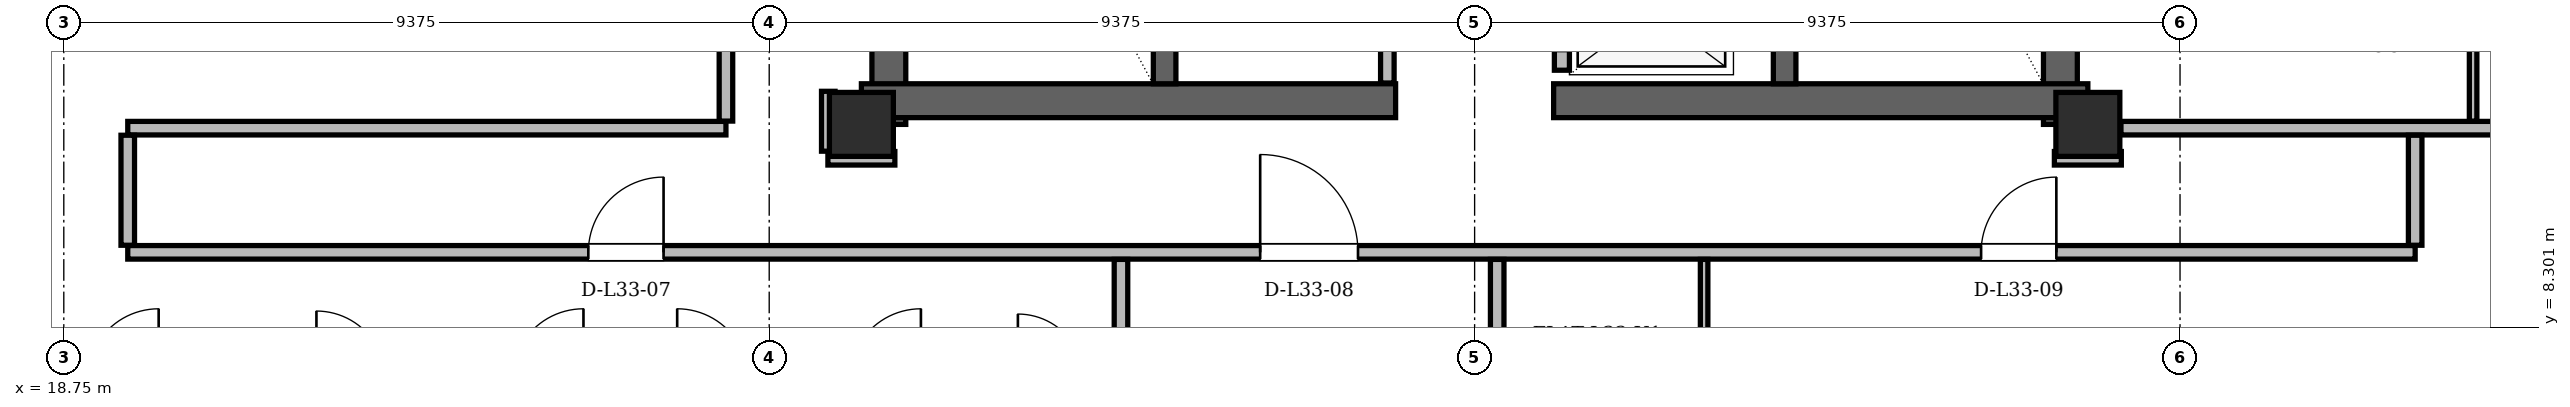
"""IFC4 building model, lengths in metres.
Left out: names, types, materials, properties, quantities, classifications, styles, units other than length and angle.
Written with IfcOpenShell. Run it as: python <this file> out.ifc"""

import sys

from ifc_helpers import new_model, si_unit, direction, frame, frame_2d, origin, origin_2d, place, context, subcontext, project, spatial, rectangle, hollow_rectangle, extrude, element, fill, save


model = new_model("IFC4")
c1 = context("Model", 3, precision=1e-05, world=origin(), true_north=direction((0.0, 1.0)))
c2 = subcontext(c1, "Body", "Model", "MODEL_VIEW")
j1 = project(units=[si_unit("LENGTHUNIT", "METRE"), si_unit("PLANEANGLEUNIT", "RADIAN")], contexts=[c1])
p1 = place(None, origin())
s1 = spatial("IfcSite", under=j1, at=p1, CompositionType="ELEMENT")
p2 = place(p1, origin())
s2 = spatial("IfcBuilding", under=s1, at=p2, CompositionType="ELEMENT")
p3 = place(p2, frame((0.0, 0.0, 126.6)))
s3 = spatial("IfcBuildingStorey", under=s2, at=p3, CompositionType="ELEMENT", Elevation=126.6)
for number, where, z_axis, x_axis in (
    (1, (29.35, 11.0, 0.0), (0.0, 0.0, 1.0), (1.0, 0.0, 0.0)),
    (2, (45.65, 11.0, 0.0), (0.0, 0.0, 1.0), (1.0, 0.0, 0.0)),
):
    element("IfcColumn", number, at=place(p3, frame(where, z_axis=z_axis, x_axis=x_axis)), inside=s3, PredefinedType="COLUMN", context=c2, shape_type="SweptSolid", body=[
        extrude(hollow_rectangle(XDim=0.85, YDim=0.85, WallThickness=0.07, at=origin_2d()), origin(), (0.0, 0.0, 1.0), 3.6),
    ])
for number, where, z_axis, x_axis in (
    (3, (29.715, 11.0, 0.0), (0.0, 0.0, 1.0), (0.0, 1.0, 0.0)),
    (4, (45.285, 11.0, 0.0), (0.0, 0.0, 1.0), (0.0, 1.0, 0.0)),
):
    element("IfcWall", number, at=place(p3, frame(where, z_axis=z_axis, x_axis=x_axis)), inside=s3, PredefinedType="SHEAR", context=c2, shape_type="SweptSolid", body=[
        extrude(rectangle(XDim=13.3, YDim=0.45, at=frame_2d((6.65, 0.0))), origin(), (0.0, 0.0, 1.0), 3.36),
    ])
for number, where, z_axis, x_axis in (
    (5, (29.35, 11.315, 0.0), (0.0, 0.0, 1.0), (1.0, 0.0, 0.0)),
    (6, (38.55, 11.315, 0.0), (0.0, 0.0, 1.0), (1.0, 0.0, 0.0)),
):
    element("IfcWall", number, at=place(p3, frame(where, z_axis=z_axis, x_axis=x_axis)), inside=s3, PredefinedType="SHEAR", context=c2, shape_type="SweptSolid", body=[
        extrude(rectangle(XDim=7.1, YDim=0.45, at=frame_2d((3.55, 0.0))), origin(), (0.0, 0.0, 1.0), 3.36),
    ])
for number, where, z_axis, x_axis in (
    (7, (33.38, 11.54, 0.0), (0.0, 0.0, 1.0), (0.0, 1.0, 0.0)),
    (8, (41.62, 11.54, 0.0), (0.0, 0.0, 1.0), (0.0, 1.0, 0.0)),
):
    element("IfcWall", number, at=place(p3, frame(where, z_axis=z_axis, x_axis=x_axis)), inside=s3, PredefinedType="SHEAR", context=c2, shape_type="SweptSolid", body=[
        extrude(rectangle(XDim=7.62, YDim=0.3, at=frame_2d((3.81, 0.0))), origin(), (0.0, 0.0, 1.0), 3.36),
    ])
p4 = place(p3, frame((14.689, 13.034, 0.0), z_axis=(0.0, 0.0, 1.0), x_axis=(0.500003640647, -0.866023301845, 0.0)))
e9 = element("IfcWall", 9, at=p4, inside=s3, PredefinedType="SOLIDWALL", context=c2, shape_type="SweptSolid", body=[
    extrude(rectangle(XDim=10.572, YDim=0.34, at=frame_2d((5.286, 0.0))), origin(), (0.0, 0.0, 1.0), 2.578),
])
p5 = place(p3, frame((36.34, 11.55, 0.0), z_axis=(0.0, 0.0, 1.0), x_axis=(0.0, 1.0, 0.0)))
e10 = element("IfcWall", 10, at=p5, inside=s3, PredefinedType="PARTITIONING", context=c2, shape_type="SweptSolid", body=[
    extrude(rectangle(XDim=5.55, YDim=0.18, at=frame_2d((2.775, 0.0))), origin(), (0.0, 0.0, 1.0), 3.36),
])
p6 = place(p5, frame((2.85, 0.0, 0.0)))
e11 = element("IfcOpeningElement", 11, at=p6, cuts=e10, PredefinedType="OPENING", context=c2, shape_type="SweptSolid", body=[
    extrude(rectangle(XDim=0.95, YDim=2.1, at=frame_2d((0.475, 1.05))), frame((0.0, 0.09, 0.0), z_axis=(0.0, -1.0, 0.0), x_axis=(1.0, 0.0, 0.0)), (0.0, 0.0, 1.0), 0.18),
])
p7 = place(p3, frame((38.66, 11.72, 0.0), z_axis=(0.0, 0.0, 1.0), x_axis=(0.0, 1.0, 0.0)))
e12 = element("IfcWall", 12, at=p7, inside=s3, PredefinedType="PARTITIONING", context=c2, shape_type="SweptSolid", body=[
    extrude(rectangle(XDim=9.1, YDim=0.2, at=frame_2d((4.55, 0.0))), origin(), (0.0, 0.0, 1.0), 3.36),
])
p8 = place(p7, frame((0.255, 0.0, 0.0)))
e13 = element("IfcOpeningElement", 13, at=p8, cuts=e12, PredefinedType="OPENING", context=c2, shape_type="SweptSolid", body=[
    extrude(rectangle(XDim=1.05, YDim=2.15, at=frame_2d((0.525, 1.075))), frame((0.0, 0.1, 0.0), z_axis=(0.0, -1.0, 0.0), x_axis=(1.0, 0.0, 0.0)), (0.0, 0.0, 1.0), 0.2),
])
p9 = place(p7, frame((2.105, 0.0, 0.0)))
e14 = element("IfcOpeningElement", 14, at=p9, cuts=e12, PredefinedType="OPENING", context=c2, shape_type="SweptSolid", body=[
    extrude(rectangle(XDim=1.05, YDim=2.15, at=frame_2d((0.525, 1.075))), frame((0.0, 0.1, 0.0), z_axis=(0.0, -1.0, 0.0), x_axis=(1.0, 0.0, 0.0)), (0.0, 0.0, 1.0), 0.2),
])
p10 = place(p7, frame((3.955, 0.0, 0.0)))
e15 = element("IfcOpeningElement", 15, at=p10, cuts=e12, PredefinedType="OPENING", context=c2, shape_type="SweptSolid", body=[
    extrude(rectangle(XDim=1.05, YDim=2.15, at=frame_2d((0.525, 1.075))), frame((0.0, 0.1, 0.0), z_axis=(0.0, -1.0, 0.0), x_axis=(1.0, 0.0, 0.0)), (0.0, 0.0, 1.0), 0.2),
])
p11 = place(p3, frame((19.6, 9.3, 0.0), z_axis=(0.0, 0.0, 1.0), x_axis=(1.0, 0.0, 0.0)))
e16 = element("IfcWall", 16, at=p11, inside=s3, PredefinedType="PARTITIONING", context=c2, shape_type="SweptSolid", body=[
    extrude(rectangle(XDim=30.4, YDim=0.18, at=frame_2d((15.2, 0.0))), origin(), (0.0, 0.0, 1.0), 2.814),
])
p12 = place(p11, frame((6.121, 0.0, 0.0)))
e17 = element("IfcOpeningElement", 17, at=p12, cuts=e16, PredefinedType="OPENING", context=c2, shape_type="SweptSolid", body=[
    extrude(rectangle(XDim=1.0, YDim=2.18, at=frame_2d((0.5, 1.09))), frame((0.0, 0.09, 0.0), z_axis=(0.0, -1.0, 0.0), x_axis=(1.0, 0.0, 0.0)), (0.0, 0.0, 1.0), 0.18),
])
p13 = place(p11, frame((15.05, 0.0, 0.0)))
e18 = element("IfcOpeningElement", 18, at=p13, cuts=e16, PredefinedType="OPENING", context=c2, shape_type="SweptSolid", body=[
    extrude(rectangle(XDim=1.3, YDim=2.2, at=frame_2d((0.65, 1.1))), frame((0.0, 0.09, 0.0), z_axis=(0.0, -1.0, 0.0), x_axis=(1.0, 0.0, 0.0)), (0.0, 0.0, 1.0), 0.18),
])
p14 = place(p11, frame((24.631, 0.0, 0.0)))
e19 = element("IfcOpeningElement", 19, at=p14, cuts=e16, PredefinedType="OPENING", context=c2, shape_type="SweptSolid", body=[
    extrude(rectangle(XDim=1.0, YDim=2.18, at=frame_2d((0.5, 1.09))), frame((0.0, 0.09, 0.0), z_axis=(0.0, -1.0, 0.0), x_axis=(1.0, 0.0, 0.0)), (0.0, 0.0, 1.0), 0.18),
])
for number, where, z_axis, x_axis in (
    (20, (28.905, 10.55, 0.0), (0.0, 0.0, 1.0), (1.0, 0.0, 0.0)),
    (21, (45.205, 10.55, 0.0), (0.0, 0.0, 1.0), (1.0, 0.0, 0.0)),
):
    element("IfcWall", number, at=place(p3, frame(where, z_axis=z_axis, x_axis=x_axis)), inside=s3, PredefinedType="PARTITIONING", context=c2, shape_type="SweptSolid", body=[
        extrude(rectangle(XDim=0.89, YDim=0.18, at=frame_2d((0.445, 0.0))), origin(), (0.0, 0.0, 1.0), 3.36),
    ])
p15 = place(p3, frame((19.6, 10.95, 0.0), z_axis=(0.0, 0.0, 1.0), x_axis=(1.0, 0.0, 0.0)))
e22 = element("IfcWall", 22, at=p15, inside=s3, PredefinedType="PARTITIONING", context=c2, shape_type="SweptSolid", body=[
    extrude(rectangle(XDim=7.95, YDim=0.18, at=frame_2d((3.975, 0.0))), origin(), (0.0, 0.0, 1.0), 3.36),
])
p16 = place(p3, frame((46.09, 10.95, 0.0), z_axis=(0.0, 0.0, 1.0), x_axis=(1.0, 0.0, 0.0)))
e23 = element("IfcWall", 23, at=p16, inside=s3, PredefinedType="PARTITIONING", context=c2, shape_type="SweptSolid", body=[
    extrude(rectangle(XDim=12.816, YDim=0.18, at=frame_2d((6.408, 0.0))), origin(), (0.0, 0.0, 1.0), 2.814),
])
p17 = place(p3, frame((19.6, 9.394, 0.0), z_axis=(0.0, 0.0, 1.0), x_axis=(0.0, 1.0, 0.0)))
e24 = element("IfcWall", 24, at=p17, inside=s3, PredefinedType="PARTITIONING", context=c2, shape_type="SweptSolid", body=[
    extrude(rectangle(XDim=1.462, YDim=0.18, at=frame_2d((0.731, 0.0))), origin(), (0.0, 0.0, 1.0), 3.36),
])
p18 = place(p3, frame((27.55, 11.044, 0.0), z_axis=(0.0, 0.0, 1.0), x_axis=(0.0, 1.0, 0.0)))
e25 = element("IfcWall", 25, at=p18, inside=s3, PredefinedType="PARTITIONING", context=c2, shape_type="SweptSolid", body=[
    extrude(rectangle(XDim=5.662, YDim=0.18, at=frame_2d((2.831, 0.0))), origin(), (0.0, 0.0, 1.0), 2.814),
])
p19 = place(p3, frame((28.91, 10.644, 0.0), z_axis=(0.0, 0.0, 1.0), x_axis=(0.0, 1.0, 0.0)))
e26 = element("IfcWall", 26, at=p19, inside=s3, PredefinedType="PARTITIONING", context=c2, shape_type="SweptSolid", body=[
    extrude(rectangle(XDim=0.796, YDim=0.18, at=frame_2d((0.398, 0.0))), origin(), (0.0, 0.0, 1.0), 2.814),
])
p20 = place(p3, frame((32.8, 5.094, 0.0), z_axis=(0.0, 0.0, 1.0), x_axis=(0.0, 1.0, 0.0)))
e27 = element("IfcWall", 27, at=p20, inside=s3, PredefinedType="PARTITIONING", context=c2, shape_type="SweptSolid", body=[
    extrude(rectangle(XDim=4.112, YDim=0.18, at=frame_2d((2.056, 0.0))), origin(), (0.0, 0.0, 1.0), 2.946),
])
p21 = place(p3, frame((37.8, 5.094, 0.0), z_axis=(0.0, 0.0, 1.0), x_axis=(0.0, 1.0, 0.0)))
e28 = element("IfcWall", 28, at=p21, inside=s3, PredefinedType="PARTITIONING", context=c2, shape_type="SweptSolid", body=[
    extrude(rectangle(XDim=4.112, YDim=0.18, at=frame_2d((2.056, 0.0))), origin(), (0.0, 0.0, 1.0), 3.36),
])
p22 = place(p3, frame((40.55, 4.052, 0.0), z_axis=(0.0, 0.0, 1.0), x_axis=(0.0, 1.0, 0.0)))
e29 = element("IfcWall", 29, at=p22, inside=s3, PredefinedType="PARTITIONING", context=c2, shape_type="SweptSolid", body=[
    extrude(rectangle(XDim=5.154, YDim=0.1, at=frame_2d((2.577, 0.0))), origin(), (0.0, 0.0, 1.0), 3.36),
])
p23 = place(p22, frame((2.172, 0.0, 0.0)))
e30 = element("IfcOpeningElement", 30, at=p23, cuts=e29, PredefinedType="OPENING", context=c2, shape_type="SweptSolid", body=[
    extrude(rectangle(XDim=0.88, YDim=2.08, at=frame_2d((0.44, 1.04))), frame((0.0, 0.05, 0.0), z_axis=(0.0, -1.0, 0.0), x_axis=(1.0, 0.0, 0.0)), (0.0, 0.0, 1.0), 0.1),
])
p24 = place(p3, frame((50.0, 9.394, 0.0), z_axis=(0.0, 0.0, 1.0), x_axis=(0.0, 1.0, 0.0)))
e31 = element("IfcWall", 31, at=p24, inside=s3, PredefinedType="PARTITIONING", context=c2, shape_type="SweptSolid", body=[
    extrude(rectangle(XDim=1.462, YDim=0.18, at=frame_2d((0.731, 0.0))), origin(), (0.0, 0.0, 1.0), 3.36),
])
p25 = place(p3, frame((50.77, 11.044, 0.0), z_axis=(0.0, 0.0, 1.0), x_axis=(0.0, 1.0, 0.0)))
e32 = element("IfcWall", 32, at=p25, inside=s3, PredefinedType="PARTITIONING", context=c2, shape_type="SweptSolid", body=[
    extrude(rectangle(XDim=3.082, YDim=0.1, at=frame_2d((1.541, 0.0))), origin(), (0.0, 0.0, 1.0), 2.814),
])
p26 = place(p12, origin())
e33 = element("IfcDoor", 33, at=p26, inside=s3, OperationType="SINGLE_SWING_RIGHT", PredefinedType="DOOR", context=c2, shape_type="SweptSolid", body=[
    extrude(rectangle(XDim=1.0, YDim=2.18, at=frame_2d((0.5, 1.09))), frame((0.0, 0.025, 0.0), z_axis=(0.0, -1.0, 0.0), x_axis=(1.0, 0.0, 0.0)), (0.0, 0.0, 1.0), 0.05),
])
fill(e17, e33)
p27 = place(p13, origin())
e34 = element("IfcDoor", 34, at=p27, inside=s3, OperationType="SINGLE_SWING_LEFT", PredefinedType="DOOR", context=c2, shape_type="SweptSolid", body=[
    extrude(rectangle(XDim=1.3, YDim=2.2, at=frame_2d((0.65, 1.1))), frame((0.0, 0.025, 0.0), z_axis=(0.0, -1.0, 0.0), x_axis=(1.0, 0.0, 0.0)), (0.0, 0.0, 1.0), 0.05),
])
fill(e18, e34)
p28 = place(p14, origin())
e35 = element("IfcDoor", 35, at=p28, inside=s3, OperationType="SINGLE_SWING_RIGHT", PredefinedType="DOOR", context=c2, shape_type="SweptSolid", body=[
    extrude(rectangle(XDim=1.0, YDim=2.18, at=frame_2d((0.5, 1.09))), frame((0.0, 0.025, 0.0), z_axis=(0.0, -1.0, 0.0), x_axis=(1.0, 0.0, 0.0)), (0.0, 0.0, 1.0), 0.05),
])
fill(e19, e35)
save(model, sys.argv[1])
